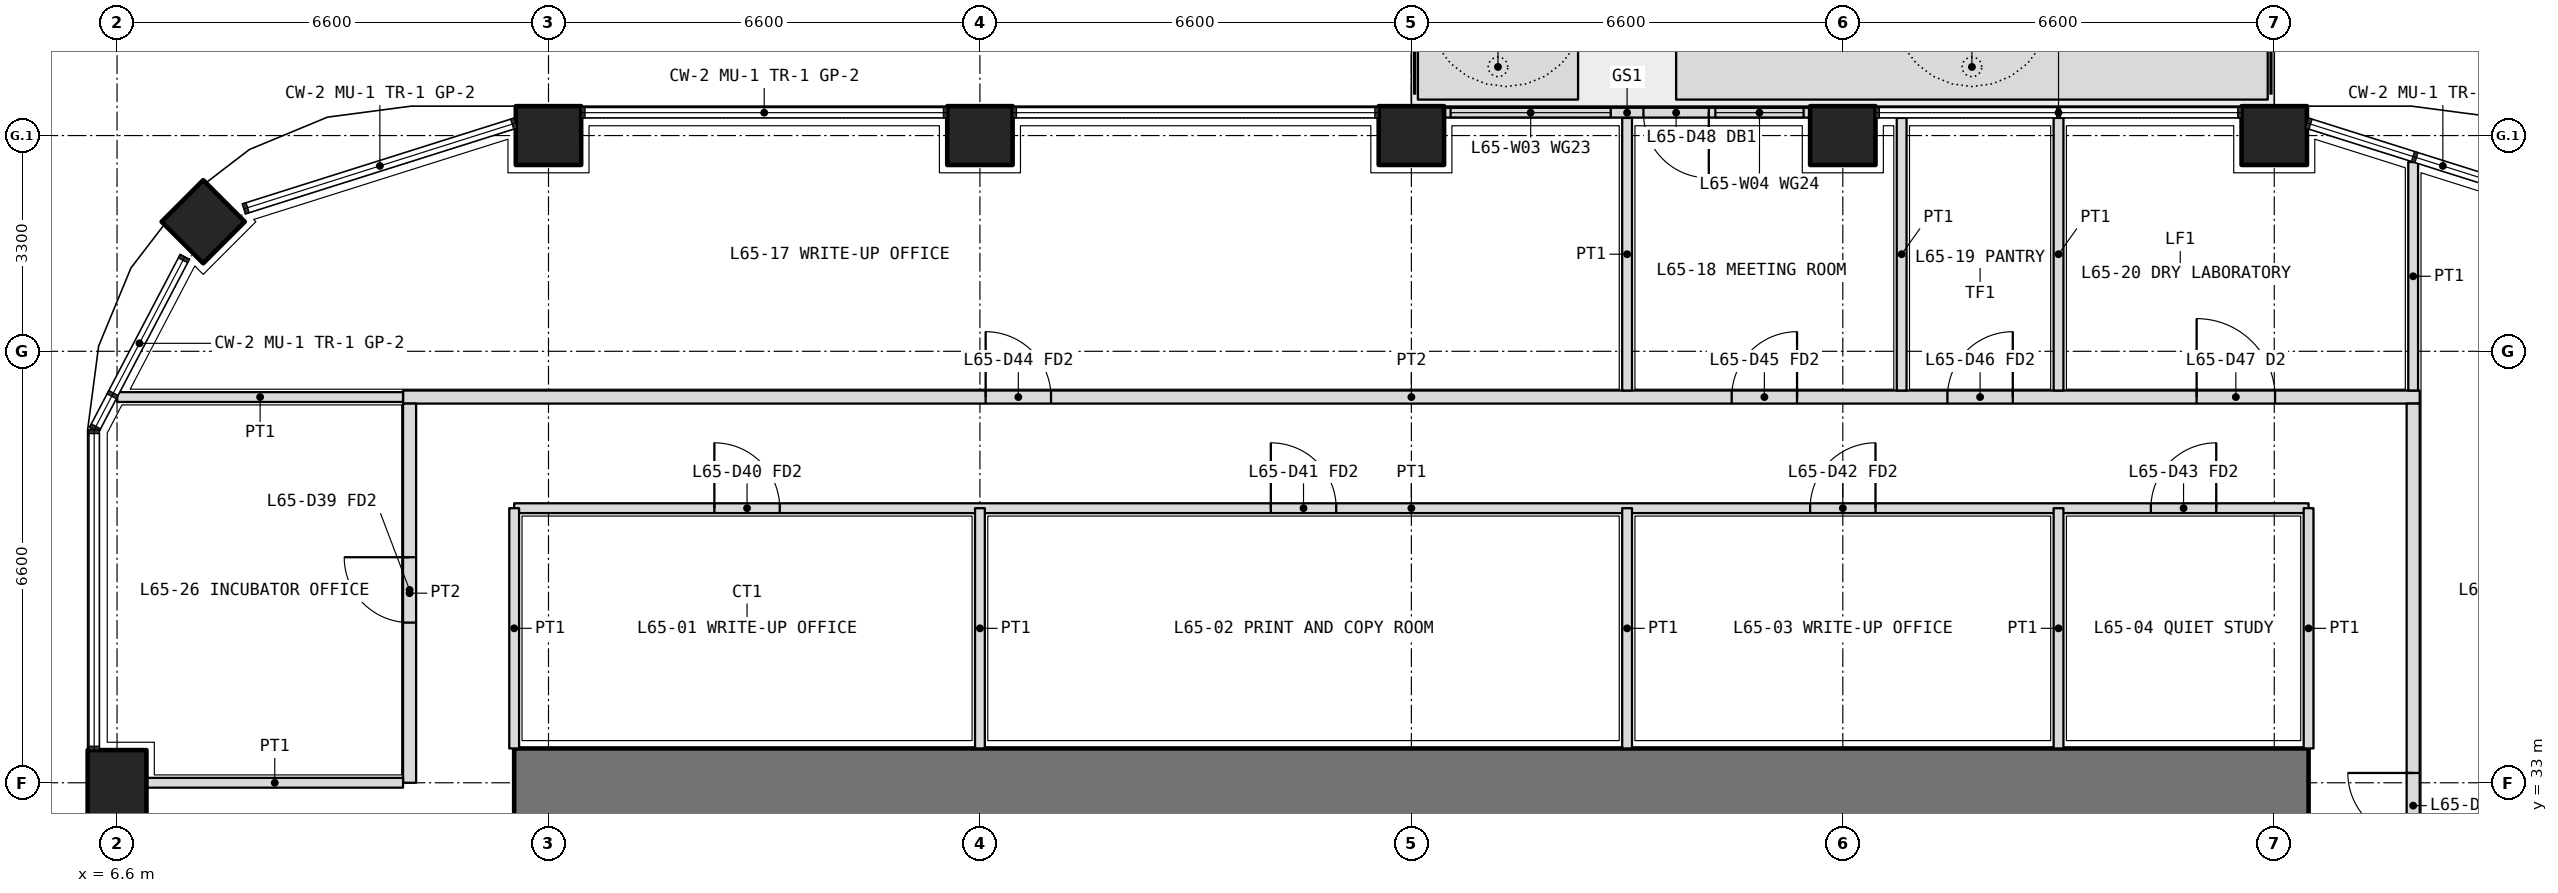
"""IFC4 building model, lengths in metres.
Left out: names, types, materials, properties, quantities, classifications, styles, units other than length and angle.
Written with IfcOpenShell. Run it as: python <this file> out.ifc"""

import sys

from ifc_helpers import new_model, si_unit, direction, frame, frame_2d, origin, origin_2d, place, context, subcontext, project, spatial, polyline, rectangle, outline, extrude, element, fill, save


model = new_model("IFC4")
c1 = context("Model", 3, precision=1e-05, world=origin(), true_north=direction((0.0, 1.0)))
c2 = subcontext(c1, "Body", "Model", "MODEL_VIEW")
j1 = project(units=[si_unit("LENGTHUNIT", "METRE"), si_unit("PLANEANGLEUNIT", "RADIAN")], contexts=[c1])
p1 = place(None, origin())
s1 = spatial("IfcSite", under=j1, at=p1, CompositionType="ELEMENT")
p2 = place(p1, origin())
s2 = spatial("IfcBuilding", under=s1, at=p2, CompositionType="ELEMENT")
p3 = place(p2, frame((0.0, 0.0, 283.8)))
s3 = spatial("IfcBuildingStorey", under=s2, at=p3, CompositionType="ELEMENT", Elevation=283.8)
p4 = place(p3, frame((7.918, 41.582, 0.0), z_axis=(0.0, 0.0, 1.0), x_axis=(0.707106781187, 0.707106781187, 0.0)))
e1 = element("IfcColumn", 1, at=p4, inside=s3, PredefinedType="COLUMN", context=c2, shape_type="SweptSolid", body=[
    extrude(rectangle(XDim=0.9, YDim=0.9, at=origin_2d()), origin(), (0.0, 0.0, 1.0), 4.2),
])
for number, where, z_axis, x_axis in (
    (2, (6.6, 33.0, 0.0), (0.0, 0.0, 1.0), (0.0, 1.0, 0.0)),
    (3, (13.2, 42.9, 0.0), (0.0, 0.0, 1.0), (1.0, 0.0, 0.0)),
    (4, (19.8, 42.9, 0.0), (0.0, 0.0, 1.0), (1.0, 0.0, 0.0)),
    (5, (26.4, 42.9, 0.0), (0.0, 0.0, 1.0), (1.0, 0.0, 0.0)),
    (6, (33.0, 42.9, 0.0), (0.0, 0.0, 1.0), (1.0, 0.0, 0.0)),
    (7, (39.6, 42.9, 0.0), (0.0, 0.0, 1.0), (1.0, 0.0, 0.0)),
):
    element("IfcColumn", number, at=place(p3, frame(where, z_axis=z_axis, x_axis=x_axis)), inside=s3, PredefinedType="COLUMN", context=c2, shape_type="SweptSolid", body=[
        extrude(rectangle(XDim=1.0, YDim=0.9, at=origin_2d()), origin(), (0.0, 0.0, 1.0), 4.2),
    ])
p5 = place(p3, origin())
e8 = element("IfcWall", 8, at=p5, inside=s3, PredefinedType="USERDEFINED", context=c2, shape_type="SweptSolid", body=[
    extrude(outline(polyline([(26.5, 43.45), (28.95, 43.45), (28.95, 44.45), (26.5, 44.45), (26.5, 43.45)]), holes=[polyline([(26.65, 43.6), (28.8, 43.6), (28.8, 44.3), (26.65, 44.3), (26.65, 43.6)])]), origin(), (0.0, 0.0, 1.0), 1.05),
])
p6 = place(p3, origin())
e9 = element("IfcWall", 9, at=p6, inside=s3, PredefinedType="USERDEFINED", context=c2, shape_type="SweptSolid", body=[
    extrude(outline(polyline([(30.45, 43.45), (39.5, 43.45), (39.5, 44.45), (30.45, 44.45), (30.45, 43.45)]), holes=[polyline([(30.6, 43.6), (39.35, 43.6), (39.35, 44.3), (30.6, 44.3), (30.6, 43.6)])]), origin(), (0.0, 0.0, 1.0), 1.05),
])
p7 = place(p3, frame((32.5, 43.25, 0.0), z_axis=(0.0, 0.0, 1.0), x_axis=(-1.0, 0.0, 0.0)))
e10 = element("IfcWall", 10, at=p7, inside=s3, PredefinedType="SOLIDWALL", context=c2, shape_type="SweptSolid", body=[
    extrude(rectangle(XDim=5.6, YDim=0.15, at=frame_2d((2.8, 0.0))), origin(), (0.0, 0.0, 1.0), 2.7),
])
p8 = place(p7, frame((1.55, 0.0, 0.0)))
e11 = element("IfcOpeningElement", 11, at=p8, cuts=e10, PredefinedType="OPENING", context=c2, shape_type="SweptSolid", body=[
    extrude(rectangle(XDim=1.0, YDim=2.4, at=frame_2d((0.5, 1.2))), frame((0.0, 0.085, 0.0), z_axis=(0.0, -1.0, 0.0), x_axis=(1.0, 0.0, 0.0)), (0.0, 0.0, 1.0), 0.17),
])
p9 = place(p7, frame((0.1, 0.0, 0.1)))
e12 = element("IfcOpeningElement", 12, at=p9, cuts=e10, PredefinedType="OPENING", context=c2, shape_type="SweptSolid", body=[
    extrude(rectangle(XDim=1.35, YDim=2.3, at=frame_2d((0.675, 1.15))), frame((0.0, 0.085, 0.0), z_axis=(0.0, -1.0, 0.0), x_axis=(1.0, 0.0, 0.0)), (0.0, 0.0, 1.0), 0.17),
])
p10 = place(p7, frame((3.05, 0.0, 0.1)))
e13 = element("IfcOpeningElement", 13, at=p10, cuts=e10, PredefinedType="OPENING", context=c2, shape_type="SweptSolid", body=[
    extrude(rectangle(XDim=2.45, YDim=2.3, at=frame_2d((1.225, 1.15))), frame((0.0, 0.085, 0.0), z_axis=(0.0, -1.0, 0.0), x_axis=(1.0, 0.0, 0.0)), (0.0, 0.0, 1.0), 0.17),
])
p11 = place(p3, frame((40.125, 33.0, 0.0), z_axis=(0.0, 0.0, 1.0), x_axis=(-1.0, 0.0, 0.0)))
e14 = element("IfcWall", 14, at=p11, inside=s3, PredefinedType="SHEAR", context=c2, shape_type="SweptSolid", body=[
    extrude(rectangle(XDim=27.45, YDim=1.05, at=frame_2d((13.725, 0.0))), origin(), (0.0, 0.0, 1.0), 4.2),
])
p12 = place(p3, frame((12.675, 37.2, 0.0), z_axis=(0.0, 0.0, 1.0), x_axis=(1.0, 0.0, 0.0)))
e15 = element("IfcWall", 15, at=p12, inside=s3, PredefinedType="PARTITIONING", context=c2, shape_type="SweptSolid", body=[
    extrude(rectangle(XDim=27.45, YDim=0.15, at=frame_2d((13.725, 0.0))), origin(), (0.0, 0.0, 1.0), 3.0),
])
p13 = place(p12, frame((3.062, 0.0, 0.0)))
e16 = element("IfcOpeningElement", 16, at=p13, cuts=e15, PredefinedType="OPENING", context=c2, shape_type="SweptSolid", body=[
    extrude(rectangle(XDim=1.0, YDim=2.1, at=frame_2d((0.5, 1.05))), frame((0.0, 0.085, 0.0), z_axis=(0.0, -1.0, 0.0), x_axis=(1.0, 0.0, 0.0)), (0.0, 0.0, 1.0), 0.17),
])
p14 = place(p12, frame((11.575, 0.0, 0.0)))
e17 = element("IfcOpeningElement", 17, at=p14, cuts=e15, PredefinedType="OPENING", context=c2, shape_type="SweptSolid", body=[
    extrude(rectangle(XDim=1.0, YDim=2.1, at=frame_2d((0.5, 1.05))), frame((0.0, 0.085, 0.0), z_axis=(0.0, -1.0, 0.0), x_axis=(1.0, 0.0, 0.0)), (0.0, 0.0, 1.0), 0.17),
])
p15 = place(p12, frame((19.825, 0.0, 0.0)))
e18 = element("IfcOpeningElement", 18, at=p15, cuts=e15, PredefinedType="OPENING", context=c2, shape_type="SweptSolid", body=[
    extrude(rectangle(XDim=1.0, YDim=2.1, at=frame_2d((0.5, 1.05))), frame((0.0, 0.085, 0.0), z_axis=(0.0, -1.0, 0.0), x_axis=(1.0, 0.0, 0.0)), (0.0, 0.0, 1.0), 0.17),
])
p16 = place(p12, frame((25.038, 0.0, 0.0)))
e19 = element("IfcOpeningElement", 19, at=p16, cuts=e15, PredefinedType="OPENING", context=c2, shape_type="SweptSolid", body=[
    extrude(rectangle(XDim=1.0, YDim=2.1, at=frame_2d((0.5, 1.05))), frame((0.0, 0.085, 0.0), z_axis=(0.0, -1.0, 0.0), x_axis=(1.0, 0.0, 0.0)), (0.0, 0.0, 1.0), 0.17),
])
for number, where, z_axis, x_axis in (
    (20, (12.675, 33.525, 0.0), (0.0, 0.0, 1.0), (0.0, 1.0, 0.0)),
    (21, (40.125, 33.525, 0.0), (0.0, 0.0, 1.0), (0.0, 1.0, 0.0)),
    (22, (19.8, 33.525, 0.0), (0.0, 0.0, 1.0), (0.0, 1.0, 0.0)),
):
    element("IfcWall", number, at=place(p3, frame(where, z_axis=z_axis, x_axis=x_axis)), inside=s3, PredefinedType="PARTITIONING", context=c2, shape_type="SweptSolid", body=[
        extrude(rectangle(XDim=3.675, YDim=0.15, at=frame_2d((1.837, 0.0))), origin(), (0.0, 0.0, 1.0), 3.0),
    ])
for number, where, z_axis, x_axis in (
    (23, (29.7, 33.525, 0.0), (0.0, 0.0, 1.0), (0.0, 1.0, 0.0)),
    (24, (36.3, 33.525, 0.0), (0.0, 0.0, 1.0), (0.0, 1.0, 0.0)),
):
    element("IfcWall", number, at=place(p3, frame(where, z_axis=z_axis, x_axis=x_axis)), inside=s3, PredefinedType="PARTITIONING", context=c2, shape_type="SweptSolid", body=[
        extrude(rectangle(XDim=3.675, YDim=0.15, at=frame_2d((1.837, 0.0))), origin(), (0.0, 0.0, 1.0), 3.9),
    ])
p17 = place(p3, frame((10.975, 38.9, 0.0), z_axis=(0.0, 0.0, 1.0), x_axis=(1.0, 0.0, 0.0)))
e25 = element("IfcWall", 25, at=p17, inside=s3, PredefinedType="PARTITIONING", context=c2, shape_type="SweptSolid", body=[
    extrude(rectangle(XDim=30.85, YDim=0.2, at=frame_2d((15.425, 0.0))), origin(), (0.0, 0.0, 1.0), 3.0),
])
p18 = place(p17, frame((8.913, 0.0, 0.0)))
e26 = element("IfcOpeningElement", 26, at=p18, cuts=e25, PredefinedType="OPENING", context=c2, shape_type="SweptSolid", body=[
    extrude(rectangle(XDim=1.0, YDim=2.1, at=frame_2d((0.5, 1.05))), frame((0.0, 0.11, 0.0), z_axis=(0.0, -1.0, 0.0), x_axis=(1.0, 0.0, 0.0)), (0.0, 0.0, 1.0), 0.22),
])
p19 = place(p17, frame((20.325, 0.0, 0.0)))
e27 = element("IfcOpeningElement", 27, at=p19, cuts=e25, PredefinedType="OPENING", context=c2, shape_type="SweptSolid", body=[
    extrude(rectangle(XDim=1.0, YDim=2.1, at=frame_2d((0.5, 1.05))), frame((0.0, 0.11, 0.0), z_axis=(0.0, -1.0, 0.0), x_axis=(1.0, 0.0, 0.0)), (0.0, 0.0, 1.0), 0.22),
])
p20 = place(p17, frame((23.625, 0.0, 0.0)))
e28 = element("IfcOpeningElement", 28, at=p20, cuts=e25, PredefinedType="OPENING", context=c2, shape_type="SweptSolid", body=[
    extrude(rectangle(XDim=1.0, YDim=2.1, at=frame_2d((0.5, 1.05))), frame((0.0, 0.11, 0.0), z_axis=(0.0, -1.0, 0.0), x_axis=(1.0, 0.0, 0.0)), (0.0, 0.0, 1.0), 0.22),
])
p21 = place(p17, frame((27.438, 0.0, 0.0)))
e29 = element("IfcOpeningElement", 29, at=p21, cuts=e25, PredefinedType="OPENING", context=c2, shape_type="SweptSolid", body=[
    extrude(rectangle(XDim=1.2, YDim=2.1, at=frame_2d((0.6, 1.05))), frame((0.0, 0.11, 0.0), z_axis=(0.0, -1.0, 0.0), x_axis=(1.0, 0.0, 0.0)), (0.0, 0.0, 1.0), 0.22),
])
p22 = place(p3, frame((11.075, 33.0, 0.0), z_axis=(0.0, 0.0, 1.0), x_axis=(0.0, 1.0, 0.0)))
e30 = element("IfcWall", 30, at=p22, inside=s3, PredefinedType="PARTITIONING", context=c2, shape_type="SweptSolid", body=[
    extrude(rectangle(XDim=5.8, YDim=0.2, at=frame_2d((2.9, 0.0))), origin(), (0.0, 0.0, 1.0), 3.0),
])
p23 = place(p22, frame((2.45, 0.0, 0.0)))
e31 = element("IfcOpeningElement", 31, at=p23, cuts=e30, PredefinedType="OPENING", context=c2, shape_type="SweptSolid", body=[
    extrude(rectangle(XDim=1.0, YDim=2.1, at=frame_2d((0.5, 1.05))), frame((0.0, 0.11, 0.0), z_axis=(0.0, -1.0, 0.0), x_axis=(1.0, 0.0, 0.0)), (0.0, 0.0, 1.0), 0.22),
])
p24 = place(p3, frame((41.725, 7.4, 0.0), z_axis=(0.0, 0.0, 1.0), x_axis=(0.0, 1.0, 0.0)))
e32 = element("IfcWall", 32, at=p24, inside=s3, PredefinedType="PARTITIONING", context=c2, shape_type="SweptSolid", body=[
    extrude(rectangle(XDim=31.4, YDim=0.2, at=frame_2d((15.7, 0.0))), origin(), (0.0, 0.0, 1.0), 3.0),
])
p25 = place(p24, frame((5.65, 0.0, 0.0)))
e33 = element("IfcOpeningElement", 33, at=p25, cuts=e32, PredefinedType="OPENING", context=c2, shape_type="SweptSolid", body=[
    extrude(rectangle(XDim=1.0, YDim=2.1, at=frame_2d((0.5, 1.05))), frame((0.0, 0.11, 0.0), z_axis=(0.0, -1.0, 0.0), x_axis=(1.0, 0.0, 0.0)), (0.0, 0.0, 1.0), 0.22),
])
p26 = place(p24, frame((13.4, 0.0, 0.0)))
e34 = element("IfcOpeningElement", 34, at=p26, cuts=e32, PredefinedType="OPENING", context=c2, shape_type="SweptSolid", body=[
    extrude(rectangle(XDim=1.0, YDim=2.1, at=frame_2d((0.5, 1.05))), frame((0.0, 0.11, 0.0), z_axis=(0.0, -1.0, 0.0), x_axis=(1.0, 0.0, 0.0)), (0.0, 0.0, 1.0), 0.22),
])
p27 = place(p24, frame((16.75, 0.0, 0.0)))
e35 = element("IfcOpeningElement", 35, at=p27, cuts=e32, PredefinedType="OPENING", context=c2, shape_type="SweptSolid", body=[
    extrude(rectangle(XDim=0.9, YDim=2.1, at=frame_2d((0.45, 1.05))), frame((0.0, 0.11, 0.0), z_axis=(0.0, -1.0, 0.0), x_axis=(1.0, 0.0, 0.0)), (0.0, 0.0, 1.0), 0.22),
])
p28 = place(p24, frame((24.75, 0.0, 0.0)))
e36 = element("IfcOpeningElement", 36, at=p28, cuts=e32, PredefinedType="OPENING", context=c2, shape_type="SweptSolid", body=[
    extrude(rectangle(XDim=1.0, YDim=2.1, at=frame_2d((0.5, 1.05))), frame((0.0, 0.11, 0.0), z_axis=(0.0, -1.0, 0.0), x_axis=(1.0, 0.0, 0.0)), (0.0, 0.0, 1.0), 0.22),
])
p29 = place(p3, frame((41.725, 42.495, 0.0), z_axis=(0.0, 0.0, 1.0), x_axis=(0.0, -1.0, 0.0)))
e37 = element("IfcWall", 37, at=p29, inside=s3, PredefinedType="PARTITIONING", context=c2, shape_type="SweptSolid", body=[
    extrude(rectangle(XDim=3.495, YDim=0.15, at=frame_2d((1.748, 0.0))), origin(), (0.0, 0.0, 1.0), 2.7),
])
p30 = place(p3, frame((6.603, 38.9, 0.0), z_axis=(0.0, 0.0, 1.0), x_axis=(1.0, 0.0, 0.0)))
e38 = element("IfcWall", 38, at=p30, inside=s3, PredefinedType="PARTITIONING", context=c2, shape_type="SweptSolid", body=[
    extrude(rectangle(XDim=4.373, YDim=0.15, at=frame_2d((2.186, 0.0))), origin(), (0.0, 0.0, 1.0), 2.7),
])
for number, where, z_axis, x_axis in (
    (39, (33.9, 43.17, 0.0), (0.0, 0.0, 1.0), (0.0, -1.0, 0.0)),
    (40, (29.7, 43.17, 0.0), (0.0, 0.0, 1.0), (0.0, -1.0, 0.0)),
    (41, (36.3, 43.17, 0.0), (0.0, 0.0, 1.0), (0.0, -1.0, 0.0)),
):
    element("IfcWall", number, at=place(p3, frame(where, z_axis=z_axis, x_axis=x_axis)), inside=s3, PredefinedType="PARTITIONING", context=c2, shape_type="SweptSolid", body=[
        extrude(rectangle(XDim=4.17, YDim=0.15, at=frame_2d((2.085, 0.0))), origin(), (0.0, 0.0, 1.0), 2.7),
    ])
p31 = place(p3, frame((7.05, 33.0, 0.0), z_axis=(0.0, 0.0, 1.0), x_axis=(1.0, 0.0, 0.0)))
e42 = element("IfcWall", 42, at=p31, inside=s3, PredefinedType="PARTITIONING", context=c2, shape_type="SweptSolid", body=[
    extrude(rectangle(XDim=3.925, YDim=0.15, at=frame_2d((1.962, 0.0))), origin(), (0.0, 0.0, 1.0), 3.0),
])
p32 = place(p8, origin())
e43 = element("IfcDoor", 43, at=p32, inside=s3, OperationType="SINGLE_SWING_LEFT", PredefinedType="DOOR", context=c2, shape_type="SweptSolid", body=[
    extrude(rectangle(XDim=1.0, YDim=2.4, at=frame_2d((0.5, 1.2))), frame((0.0, 0.025, 0.0), z_axis=(0.0, -1.0, 0.0), x_axis=(1.0, 0.0, 0.0)), (0.0, 0.0, 1.0), 0.05),
])
fill(e11, e43)
p33 = place(p9, origin())
e44 = element("IfcWindow", 44, at=p33, inside=s3, PartitioningType="SINGLE_PANEL", PredefinedType="WINDOW", context=c2, shape_type="SweptSolid", body=[
    extrude(rectangle(XDim=1.35, YDim=2.3, at=frame_2d((0.675, 1.15))), frame((0.0, 0.03, 0.0), z_axis=(0.0, -1.0, 0.0), x_axis=(1.0, 0.0, 0.0)), (0.0, 0.0, 1.0), 0.06),
])
fill(e12, e44)
p34 = place(p10, origin())
e45 = element("IfcWindow", 45, at=p34, inside=s3, PartitioningType="SINGLE_PANEL", PredefinedType="WINDOW", context=c2, shape_type="SweptSolid", body=[
    extrude(rectangle(XDim=2.45, YDim=2.3, at=frame_2d((1.225, 1.15))), frame((0.0, 0.03, 0.0), z_axis=(0.0, -1.0, 0.0), x_axis=(1.0, 0.0, 0.0)), (0.0, 0.0, 1.0), 0.06),
])
fill(e13, e45)
p35 = place(p13, origin())
e46 = element("IfcDoor", 46, at=p35, inside=s3, OperationType="SINGLE_SWING_LEFT", PredefinedType="DOOR", context=c2, shape_type="SweptSolid", body=[
    extrude(rectangle(XDim=1.0, YDim=2.1, at=frame_2d((0.5, 1.05))), frame((0.0, 0.025, 0.0), z_axis=(0.0, -1.0, 0.0), x_axis=(1.0, 0.0, 0.0)), (0.0, 0.0, 1.0), 0.05),
])
fill(e16, e46)
p36 = place(p14, origin())
e47 = element("IfcDoor", 47, at=p36, inside=s3, OperationType="SINGLE_SWING_LEFT", PredefinedType="DOOR", context=c2, shape_type="SweptSolid", body=[
    extrude(rectangle(XDim=1.0, YDim=2.1, at=frame_2d((0.5, 1.05))), frame((0.0, 0.025, 0.0), z_axis=(0.0, -1.0, 0.0), x_axis=(1.0, 0.0, 0.0)), (0.0, 0.0, 1.0), 0.05),
])
fill(e17, e47)
p37 = place(p15, origin())
e48 = element("IfcDoor", 48, at=p37, inside=s3, OperationType="SINGLE_SWING_RIGHT", PredefinedType="DOOR", context=c2, shape_type="SweptSolid", body=[
    extrude(rectangle(XDim=1.0, YDim=2.1, at=frame_2d((0.5, 1.05))), frame((0.0, 0.025, 0.0), z_axis=(0.0, -1.0, 0.0), x_axis=(1.0, 0.0, 0.0)), (0.0, 0.0, 1.0), 0.05),
])
fill(e18, e48)
p38 = place(p16, origin())
e49 = element("IfcDoor", 49, at=p38, inside=s3, OperationType="SINGLE_SWING_RIGHT", PredefinedType="DOOR", context=c2, shape_type="SweptSolid", body=[
    extrude(rectangle(XDim=1.0, YDim=2.1, at=frame_2d((0.5, 1.05))), frame((0.0, 0.025, 0.0), z_axis=(0.0, -1.0, 0.0), x_axis=(1.0, 0.0, 0.0)), (0.0, 0.0, 1.0), 0.05),
])
fill(e19, e49)
p39 = place(p28, origin())
e50 = element("IfcDoor", 50, at=p39, inside=s3, OperationType="SINGLE_SWING_RIGHT", PredefinedType="DOOR", context=c2, shape_type="SweptSolid", body=[
    extrude(rectangle(XDim=1.0, YDim=2.1, at=frame_2d((0.5, 1.05))), frame((0.0, 0.025, 0.0), z_axis=(0.0, -1.0, 0.0), x_axis=(1.0, 0.0, 0.0)), (0.0, 0.0, 1.0), 0.05),
])
fill(e36, e50)
p40 = place(p18, origin())
e51 = element("IfcDoor", 51, at=p40, inside=s3, OperationType="SINGLE_SWING_LEFT", PredefinedType="DOOR", context=c2, shape_type="SweptSolid", body=[
    extrude(rectangle(XDim=1.0, YDim=2.1, at=frame_2d((0.5, 1.05))), frame((0.0, 0.025, 0.0), z_axis=(0.0, -1.0, 0.0), x_axis=(1.0, 0.0, 0.0)), (0.0, 0.0, 1.0), 0.05),
])
fill(e26, e51)
p41 = place(p19, origin())
e52 = element("IfcDoor", 52, at=p41, inside=s3, OperationType="SINGLE_SWING_RIGHT", PredefinedType="DOOR", context=c2, shape_type="SweptSolid", body=[
    extrude(rectangle(XDim=1.0, YDim=2.1, at=frame_2d((0.5, 1.05))), frame((0.0, 0.025, 0.0), z_axis=(0.0, -1.0, 0.0), x_axis=(1.0, 0.0, 0.0)), (0.0, 0.0, 1.0), 0.05),
])
fill(e27, e52)
p42 = place(p20, origin())
e53 = element("IfcDoor", 53, at=p42, inside=s3, OperationType="SINGLE_SWING_RIGHT", PredefinedType="DOOR", context=c2, shape_type="SweptSolid", body=[
    extrude(rectangle(XDim=1.0, YDim=2.1, at=frame_2d((0.5, 1.05))), frame((0.0, 0.025, 0.0), z_axis=(0.0, -1.0, 0.0), x_axis=(1.0, 0.0, 0.0)), (0.0, 0.0, 1.0), 0.05),
])
fill(e28, e53)
p43 = place(p21, origin())
e54 = element("IfcDoor", 54, at=p43, inside=s3, OperationType="DOUBLE_DOOR_SINGLE_SWING", PredefinedType="DOOR", context=c2, shape_type="SweptSolid", body=[
    extrude(rectangle(XDim=1.2, YDim=2.1, at=frame_2d((0.6, 1.05))), frame((0.0, 0.025, 0.0), z_axis=(0.0, -1.0, 0.0), x_axis=(1.0, 0.0, 0.0)), (0.0, 0.0, 1.0), 0.05),
])
fill(e29, e54)
p44 = place(p23, origin())
e55 = element("IfcDoor", 55, at=p44, inside=s3, OperationType="SINGLE_SWING_RIGHT", PredefinedType="DOOR", context=c2, shape_type="SweptSolid", body=[
    extrude(rectangle(XDim=1.0, YDim=2.1, at=frame_2d((0.5, 1.05))), frame((0.0, 0.025, 0.0), z_axis=(0.0, -1.0, 0.0), x_axis=(1.0, 0.0, 0.0)), (0.0, 0.0, 1.0), 0.05),
])
fill(e31, e55)
save(model, sys.argv[1])
